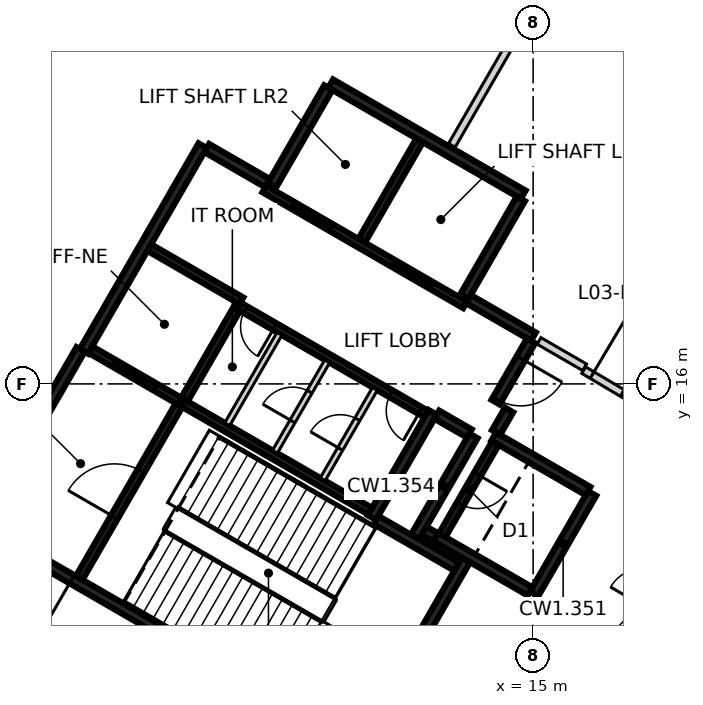
"""IFC4 building model, lengths in metres.
Left out: names, types, materials, properties, quantities, classifications, styles, units other than length and angle.
Written with IfcOpenShell. Run it as: python <this file> out.ifc"""

import sys

from ifc_helpers import new_model, si_unit, direction, frame, frame_2d, origin, place, context, subcontext, project, spatial, rectangle, extrude, element, fill, save


model = new_model("IFC4")
c1 = context("Model", 3, precision=1e-05, world=origin(), true_north=direction((0.0, 1.0)))
c2 = subcontext(c1, "Body", "Model", "MODEL_VIEW")
j1 = project(units=[si_unit("LENGTHUNIT", "METRE"), si_unit("PLANEANGLEUNIT", "RADIAN")], contexts=[c1])
p1 = place(None, origin())
s1 = spatial("IfcSite", under=j1, at=p1, CompositionType="ELEMENT")
p2 = place(p1, origin())
s2 = spatial("IfcBuilding", under=s1, at=p2, CompositionType="ELEMENT")
p3 = place(p2, frame((0.0, 0.0, 19.5)))
s3 = spatial("IfcBuildingStorey", under=s2, at=p3, CompositionType="ELEMENT", Elevation=19.5)
p4 = place(p3, frame((10.42, 6.498, 0.0), z_axis=(0.0, 0.0, 1.0), x_axis=(-0.866021906294, 0.500006057782, 0.0)))
e1 = element("IfcWall", 1, at=p4, inside=s3, PredefinedType="SHEAR", context=c2, shape_type="SweptSolid", body=[
    extrude(rectangle(XDim=11.55, YDim=0.25, at=frame_2d((5.775, 0.0))), origin(), (0.0, 0.0, 1.0), 4.55),
])
p5 = place(p4, frame((10.025, 0.0, 0.0)))
e2 = element("IfcOpeningElement", 2, at=p5, cuts=e1, PredefinedType="OPENING", context=c2, shape_type="SweptSolid", body=[
    extrude(rectangle(XDim=1.2, YDim=2.1, at=frame_2d((0.6, 1.05))), frame((0.0, 0.135, 0.0), z_axis=(0.0, -1.0, 0.0), x_axis=(1.0, 0.0, 0.0)), (0.0, 0.0, 1.0), 0.27),
])
p6 = place(p4, frame((8.725, 0.0, 0.0)))
e3 = element("IfcOpeningElement", 3, at=p6, cuts=e1, PredefinedType="OPENING", context=c2, shape_type="SweptSolid", body=[
    extrude(rectangle(XDim=1.2, YDim=2.1, at=frame_2d((0.6, 1.05))), frame((0.0, 0.135, 0.0), z_axis=(0.0, -1.0, 0.0), x_axis=(1.0, 0.0, 0.0)), (0.0, 0.0, 1.0), 0.27),
])
p7 = place(p3, frame((3.179, 16.856, 0.0), z_axis=(0.0, 0.0, 1.0), x_axis=(0.500004234368, 0.866022959057, 0.0)))
e4 = element("IfcWall", 4, at=p7, inside=s3, PredefinedType="SHEAR", context=c2, shape_type="SweptSolid", body=[
    extrude(rectangle(XDim=6.25, YDim=0.25, at=frame_2d((3.125, 0.0))), origin(), (0.0, 0.0, 1.0), 4.55),
])
p8 = place(p3, frame((9.673, 23.903, 0.0), z_axis=(0.0, 0.0, 1.0), x_axis=(0.86603616409, -0.499981362141, 0.0)))
e5 = element("IfcWall", 5, at=p8, inside=s3, PredefinedType="SHEAR", context=c2, shape_type="SweptSolid", body=[
    extrude(rectangle(XDim=5.85, YDim=0.25, at=frame_2d((2.925, 0.0))), origin(), (0.0, 0.0, 1.0), 4.55),
])
p9 = place(p3, frame((0.48, 12.381, 0.0), z_axis=(0.0, 0.0, 1.0), x_axis=(0.49999885962, 0.866026062182, 0.0)))
e6 = element("IfcWall", 6, at=p9, inside=s3, PredefinedType="SHEAR", context=c2, shape_type="SweptSolid", body=[
    extrude(rectangle(XDim=5.225, YDim=0.25, at=frame_2d((2.612, 0.0))), origin(), (0.0, 0.0, 1.0), 4.55),
])
p10 = place(p3, frame((13.238, 11.378, 0.0), z_axis=(0.0, 0.0, 1.0), x_axis=(-0.500008851346, -0.866020293397, 0.0)))
e7 = element("IfcWall", 7, at=p10, inside=s3, PredefinedType="SHEAR", context=c2, shape_type="SweptSolid", body=[
    extrude(rectangle(XDim=5.51, YDim=0.25, at=frame_2d((2.755, 0.0))), origin(), (0.0, 0.0, 1.0), 4.55),
])
p11 = place(p3, frame((12.357, 15.252, 0.0), z_axis=(0.0, 0.0, 1.0), x_axis=(-0.500028443584, -0.866008981251, 0.0)))
e8 = element("IfcWall", 8, at=p11, inside=s3, PredefinedType="SHEAR", context=c2, shape_type="SweptSolid", body=[
    extrude(rectangle(XDim=3.2, YDim=0.25, at=frame_2d((1.6, 0.0))), origin(), (0.0, 0.0, 1.0), 4.55),
])
for number, where, z_axis, x_axis in (
    (9, (8.123, 21.219, 0.0), (0.0, 0.0, 1.0), (0.5, 0.866, 0.0)),
    (10, (14.676, 20.87, 0.0), (0.0, 0.0, 1.0), (-0.5, -0.866, 0.0)),
):
    element("IfcWall", number, at=place(p3, frame(where, z_axis=z_axis, x_axis=x_axis)), inside=s3, PredefinedType="SHEAR", context=c2, shape_type="SweptSolid", body=[
        extrude(rectangle(XDim=2.975, YDim=0.25, at=frame_2d((1.487, 0.0))), origin(), (0.0, 0.0, 1.0), 4.55),
    ])
p12 = place(p3, frame((16.552, 13.119, 0.0), z_axis=(0.0, 0.0, 1.0), x_axis=(-0.499978833458, -0.866037623948, 0.0)))
e11 = element("IfcWall", 11, at=p12, inside=s3, PredefinedType="SHEAR", context=c2, shape_type="SweptSolid", body=[
    extrude(rectangle(XDim=3.05, YDim=0.25, at=frame_2d((1.525, 0.0))), origin(), (0.0, 0.0, 1.0), 4.55),
])
p13 = place(p3, frame((14.918, 10.54, 0.0), z_axis=(0.0, 0.0, 1.0), x_axis=(-0.866063538972, 0.499933942099, 0.0)))
e12 = element("IfcWall", 12, at=p13, inside=s3, PredefinedType="SHEAR", context=c2, shape_type="SweptSolid", body=[
    extrude(rectangle(XDim=2.865, YDim=0.25, at=frame_2d((1.432, 0.0))), origin(), (0.0, 0.0, 1.0), 4.55),
])
p14 = place(p3, frame((13.963, 14.614, 0.0), z_axis=(0.0, 0.0, 1.0), x_axis=(0.866042235819, -0.499970844928, 0.0)))
e13 = element("IfcWall", 13, at=p14, inside=s3, PredefinedType="SHEAR", context=c2, shape_type="SweptSolid", body=[
    extrude(rectangle(XDim=2.865, YDim=0.25, at=frame_2d((1.432, 0.0))), origin(), (0.0, 0.0, 1.0), 4.55),
])
p15 = place(p3, frame((11.888, 11.961, 0.0), z_axis=(0.0, 0.0, 1.0), x_axis=(0.500003324108, 0.866023484601, 0.0)))
e14 = element("IfcWall", 14, at=p15, inside=s3, PredefinedType="SHEAR", context=c2, shape_type="SweptSolid", body=[
    extrude(rectangle(XDim=3.085, YDim=0.25, at=frame_2d((1.542, 0.0))), origin(), (0.0, 0.0, 1.0), 4.55),
])
p16 = place(p3, frame((10.865, 12.418, 0.0), z_axis=(0.0, 0.0, 1.0), x_axis=(0.866026229868, -0.499998569178, 0.0)))
e15 = element("IfcWall", 15, at=p16, inside=s3, PredefinedType="SHEAR", context=c2, shape_type="SweptSolid", body=[
    extrude(rectangle(XDim=2.449, YDim=0.25, at=frame_2d((1.225, 0.0))), origin(), (0.0, 0.0, 1.0), 4.55),
])
p17 = place(p3, frame((13.297, 18.231, 0.0), z_axis=(0.0, 0.0, 1.0), x_axis=(0.866043531843, -0.499968599967, 0.0)))
e16 = element("IfcWall", 16, at=p17, inside=s3, PredefinedType="SHEAR", context=c2, shape_type="SweptSolid", body=[
    extrude(rectangle(XDim=1.975, YDim=0.25, at=frame_2d((0.987, 0.0))), origin(), (0.0, 0.0, 1.0), 4.55),
])
p18 = place(p3, frame((6.413, 22.206, 0.0), z_axis=(0.0, 0.0, 1.0), x_axis=(0.866016279763, -0.500015802937, 0.0)))
e17 = element("IfcWall", 17, at=p18, inside=s3, PredefinedType="SHEAR", context=c2, shape_type="SweptSolid", body=[
    extrude(rectangle(XDim=1.849, YDim=0.25, at=frame_2d((0.925, 0.0))), origin(), (0.0, 0.0, 1.0), 4.55),
])
p19 = place(p3, frame((14.945, 17.135, 0.0), z_axis=(0.0, 0.0, 1.0), x_axis=(-0.499983108224, -0.866035156036, 0.0)))
e18 = element("IfcWall", 18, at=p19, inside=s3, PredefinedType="SHEAR", context=c2, shape_type="SweptSolid", body=[
    extrude(rectangle(XDim=1.865, YDim=0.25, at=frame_2d((0.932, 0.0))), origin(), (0.0, 0.0, 1.0), 4.55),
])
p20 = place(p19, frame((0.535, 0.0, 0.0)))
e19 = element("IfcOpeningElement", 19, at=p20, cuts=e18, PredefinedType="OPENING", context=c2, shape_type="SweptSolid", body=[
    extrude(rectangle(XDim=1.25, YDim=2.1, at=frame_2d((0.625, 1.05))), frame((0.0, 0.135, 0.0), z_axis=(0.0, -1.0, 0.0), x_axis=(1.0, 0.0, 0.0)), (0.0, 0.0, 1.0), 0.27),
])
p21 = place(p3, frame((13.322, 14.695, 0.0), z_axis=(0.0, 0.0, 1.0), x_axis=(-0.866017078145, 0.500014420154, 0.0)))
e20 = element("IfcWall", 20, at=p21, inside=s3, PredefinedType="SHEAR", context=c2, shape_type="SweptSolid", body=[
    extrude(rectangle(XDim=0.989, YDim=0.25, at=frame_2d((0.495, 0.0))), origin(), (0.0, 0.0, 1.0), 4.55),
])
p22 = place(p3, frame((14.368, 15.315, 0.0), z_axis=(0.0, 0.0, 1.0), x_axis=(-0.499897359611, -0.866084655132, 0.0)))
e21 = element("IfcWall", 21, at=p22, inside=s3, PredefinedType="SHEAR", context=c2, shape_type="SweptSolid", body=[
    extrude(rectangle(XDim=0.685, YDim=0.25, at=frame_2d((0.342, 0.0))), origin(), (0.0, 0.0, 1.0), 4.55),
])
p23 = place(p3, frame((12.433, 11.964, 0.0), z_axis=(0.0, 0.0, 1.0), x_axis=(-0.866055875208, 0.499947218231, 0.0)))
e22 = element("IfcWall", 22, at=p23, inside=s3, PredefinedType="SHEAR", context=c2, shape_type="SweptSolid", body=[
    extrude(rectangle(XDim=0.345, YDim=0.25, at=frame_2d((0.172, 0.0))), origin(), (0.0, 0.0, 1.0), 4.55),
])
p24 = place(p3, frame((13.21, 18.08, 0.0), z_axis=(0.0, 0.0, 1.0), x_axis=(-0.866030299012, 0.499991521122, 0.0)))
e23 = element("IfcWall", 23, at=p24, inside=s3, PredefinedType="SHEAR", context=c2, shape_type="SweptSolid", body=[
    extrude(rectangle(XDim=6.1, YDim=0.2, at=frame_2d((3.05, 0.0))), origin(), (0.0, 0.0, 1.0), 4.55),
])
p25 = place(p24, frame((1.0, 0.0, 0.0)))
e24 = element("IfcOpeningElement", 24, at=p25, cuts=e23, PredefinedType="OPENING", context=c2, shape_type="SweptSolid", body=[
    extrude(rectangle(XDim=1.2, YDim=2.1, at=frame_2d((0.6, 1.05))), frame((0.0, 0.11, 0.0), z_axis=(0.0, -1.0, 0.0), x_axis=(1.0, 0.0, 0.0)), (0.0, 0.0, 1.0), 0.22),
])
p26 = place(p24, frame((4.05, 0.0, 0.0)))
e25 = element("IfcOpeningElement", 25, at=p26, cuts=e23, PredefinedType="OPENING", context=c2, shape_type="SweptSolid", body=[
    extrude(rectangle(XDim=1.2, YDim=2.1, at=frame_2d((0.6, 1.05))), frame((0.0, 0.11, 0.0), z_axis=(0.0, -1.0, 0.0), x_axis=(1.0, 0.0, 0.0)), (0.0, 0.0, 1.0), 0.22),
])
p27 = place(p3, frame((5.775, 15.502, 0.0), z_axis=(0.0, 0.0, 1.0), x_axis=(0.866020080793, -0.500009219579, 0.0)))
e26 = element("IfcWall", 26, at=p27, inside=s3, PredefinedType="SHEAR", context=c2, shape_type="SweptSolid", body=[
    extrude(rectangle(XDim=5.699, YDim=0.2, at=frame_2d((2.85, 0.0))), origin(), (0.0, 0.0, 1.0), 4.55),
])
p28 = place(p3, frame((12.185, 15.207, 0.0), z_axis=(0.0, 0.0, 1.0), x_axis=(-0.866020080793, 0.500009219579, 0.0)))
e27 = element("IfcWall", 27, at=p28, inside=s3, PredefinedType="SHEAR", context=c2, shape_type="SweptSolid", body=[
    extrude(rectangle(XDim=5.699, YDim=0.2, at=frame_2d((2.85, 0.0))), origin(), (0.0, 0.0, 1.0), 4.55),
])
p29 = place(p28, frame((0.174, 0.0, 0.0)))
e28 = element("IfcOpeningElement", 28, at=p29, cuts=e27, PredefinedType="OPENING", context=c2, shape_type="SweptSolid", body=[
    extrude(rectangle(XDim=0.9, YDim=2.1, at=frame_2d((0.45, 1.05))), frame((0.0, 0.11, 0.0), z_axis=(0.0, -1.0, 0.0), x_axis=(1.0, 0.0, 0.0)), (0.0, 0.0, 1.0), 0.22),
])
p30 = place(p28, frame((4.599, 0.0, 0.0)))
e29 = element("IfcOpeningElement", 29, at=p30, cuts=e27, PredefinedType="OPENING", context=c2, shape_type="SweptSolid", body=[
    extrude(rectangle(XDim=0.9, YDim=2.1, at=frame_2d((0.45, 1.05))), frame((0.0, 0.11, 0.0), z_axis=(0.0, -1.0, 0.0), x_axis=(1.0, 0.0, 0.0)), (0.0, 0.0, 1.0), 0.22),
])
p31 = place(p3, frame((3.057, 10.895, 0.0), z_axis=(0.0, 0.0, 1.0), x_axis=(0.499989418164, 0.866031513124, 0.0)))
e30 = element("IfcWall", 30, at=p31, inside=s3, PredefinedType="SHEAR", context=c2, shape_type="SweptSolid", body=[
    extrude(rectangle(XDim=5.251, YDim=0.2, at=frame_2d((2.625, 0.0))), origin(), (0.0, 0.0, 1.0), 4.55),
])
p32 = place(p31, frame((1.849, 0.0, 0.0)))
e31 = element("IfcOpeningElement", 31, at=p32, cuts=e30, PredefinedType="OPENING", context=c2, shape_type="SweptSolid", body=[
    extrude(rectangle(XDim=1.4, YDim=2.1, at=frame_2d((0.7, 1.05))), frame((0.0, 0.11, 0.0), z_axis=(0.0, -1.0, 0.0), x_axis=(1.0, 0.0, 0.0)), (0.0, 0.0, 1.0), 0.22),
])
p33 = place(p3, frame((10.489, 19.767, 0.0), z_axis=(0.0, 0.0, 1.0), x_axis=(0.499946628782, 0.866056215479, 0.0)))
e32 = element("IfcWall", 32, at=p33, inside=s3, PredefinedType="SHEAR", context=c2, shape_type="SweptSolid", body=[
    extrude(rectangle(XDim=3.048, YDim=0.2, at=frame_2d((1.524, 0.0))), origin(), (0.0, 0.0, 1.0), 4.55),
])
p34 = place(p3, frame((14.008, 14.442, 0.0), z_axis=(0.0, 0.0, 1.0), x_axis=(-0.499986818241, -0.866033014143, 0.0)))
e33 = element("IfcWall", 33, at=p34, inside=s3, PredefinedType="SHEAR", context=c2, shape_type="SweptSolid", body=[
    extrude(rectangle(XDim=2.798, YDim=0.2, at=frame_2d((1.399, 0.0))), origin(), (0.0, 0.0, 1.0), 4.55),
])
p35 = place(p34, frame((0.949, 0.0, 0.0)))
e34 = element("IfcOpeningElement", 34, at=p35, cuts=e33, PredefinedType="OPENING", context=c2, shape_type="SweptSolid", body=[
    extrude(rectangle(XDim=0.9, YDim=2.1, at=frame_2d((0.45, 1.05))), frame((0.0, 0.11, 0.0), z_axis=(0.0, -1.0, 0.0), x_axis=(1.0, 0.0, 0.0)), (0.0, 0.0, 1.0), 0.22),
])
p36 = place(p3, frame((7.199, 17.97, 0.0), z_axis=(0.0, 0.0, 1.0), x_axis=(-0.499968400327, -0.866043647095, 0.0)))
e35 = element("IfcWall", 35, at=p36, inside=s3, PredefinedType="SHEAR", context=c2, shape_type="SweptSolid", body=[
    extrude(rectangle(XDim=2.75, YDim=0.2, at=frame_2d((1.375, 0.0))), origin(), (0.0, 0.0, 1.0), 4.55),
])
p37 = place(p3, frame((5.725, 15.531, 0.0), z_axis=(0.0, 0.0, 1.0), x_axis=(-0.866037306777, 0.499979382845, 0.0)))
e36 = element("IfcWall", 36, at=p37, inside=s3, PredefinedType="SHEAR", context=c2, shape_type="SweptSolid", body=[
    extrude(rectangle(XDim=2.742, YDim=0.2, at=frame_2d((1.371, 0.0))), origin(), (0.0, 0.0, 1.0), 4.55),
])
p38 = place(p37, frame((0.743, 0.0, 0.0)))
e37 = element("IfcOpeningElement", 37, at=p38, cuts=e36, PredefinedType="OPENING", context=c2, shape_type="SweptSolid", body=[
    extrude(rectangle(XDim=1.3, YDim=2.1, at=frame_2d((0.65, 1.05))), frame((0.0, 0.11, 0.0), z_axis=(0.0, -1.0, 0.0), x_axis=(1.0, 0.0, 0.0)), (0.0, 0.0, 1.0), 0.22),
])
p39 = place(p3, frame((4.901, 19.586, 0.0), z_axis=(0.0, 0.0, 1.0), x_axis=(0.866022890907, -0.500004352405, 0.0)))
e38 = element("IfcWall", 38, at=p39, inside=s3, PredefinedType="SHEAR", context=c2, shape_type="SweptSolid", body=[
    extrude(rectangle(XDim=2.799, YDim=0.2, at=frame_2d((1.399, 0.0))), origin(), (0.0, 0.0, 1.0), 4.55),
])
p40 = place(p3, frame((9.462, 13.489, 0.0), z_axis=(0.0, 0.0, 1.0), x_axis=(0.50002746344, 0.86600954718, 0.0)))
e39 = element("IfcWall", 39, at=p40, inside=s3, PredefinedType="PARTITIONING", context=c2, shape_type="SweptSolid", body=[
    extrude(rectangle(XDim=2.748, YDim=0.15, at=frame_2d((1.374, 0.0))), origin(), (0.0, 0.0, 1.0), 4.55),
])
p41 = place(p40, frame((0.924, 0.0, 0.0)))
e40 = element("IfcOpeningElement", 40, at=p41, cuts=e39, PredefinedType="OPENING", context=c2, shape_type="SweptSolid", body=[
    extrude(rectangle(XDim=0.9, YDim=2.1, at=frame_2d((0.45, 1.05))), frame((0.0, 0.085, 0.0), z_axis=(0.0, -1.0, 0.0), x_axis=(1.0, 0.0, 0.0)), (0.0, 0.0, 1.0), 0.17),
])
p42 = place(p3, frame((8.207, 14.214, 0.0), z_axis=(0.0, 0.0, 1.0), x_axis=(0.499922376475, 0.866070215109, 0.0)))
e41 = element("IfcWall", 41, at=p42, inside=s3, PredefinedType="PARTITIONING", context=c2, shape_type="SweptSolid", body=[
    extrude(rectangle(XDim=2.749, YDim=0.15, at=frame_2d((1.374, 0.0))), origin(), (0.0, 0.0, 1.0), 4.55),
])
p43 = place(p42, frame((0.924, 0.0, 0.0)))
e42 = element("IfcOpeningElement", 42, at=p43, cuts=e41, PredefinedType="OPENING", context=c2, shape_type="SweptSolid", body=[
    extrude(rectangle(XDim=0.9, YDim=2.1, at=frame_2d((0.45, 1.05))), frame((0.0, 0.085, 0.0), z_axis=(0.0, -1.0, 0.0), x_axis=(1.0, 0.0, 0.0)), (0.0, 0.0, 1.0), 0.17),
])
p44 = place(p3, frame((6.951, 14.939, 0.0), z_axis=(0.0, 0.0, 1.0), x_axis=(0.50002746344, 0.86600954718, 0.0)))
e43 = element("IfcWall", 43, at=p44, inside=s3, PredefinedType="PARTITIONING", context=c2, shape_type="SweptSolid", body=[
    extrude(rectangle(XDim=2.748, YDim=0.15, at=frame_2d((1.374, 0.0))), origin(), (0.0, 0.0, 1.0), 4.55),
])
p45 = place(p3, frame((15.156, 17.131, 0.0), z_axis=(0.0, 0.0, 1.0), x_axis=(0.865639364436, -0.500668044455, 0.0)))
e44 = element("IfcWall", 44, at=p45, inside=s3, PredefinedType="PARTITIONING", context=c2, shape_type="SweptSolid", body=[
    extrude(rectangle(XDim=1.385, YDim=0.2, at=frame_2d((0.693, 0.0))), origin(), (0.0, 0.0, 1.0), 4.55),
])
p46 = place(p3, frame((16.331, 16.362, 0.0), z_axis=(0.0, 0.0, 1.0), x_axis=(0.860005465563, -0.510284821645, 0.0)))
e45 = element("IfcWall", 45, at=p46, inside=s3, PredefinedType="PARTITIONING", context=c2, shape_type="SweptSolid", body=[
    extrude(rectangle(XDim=2.51, YDim=0.2, at=frame_2d((1.255, 0.0))), origin(), (0.0, 0.0, 1.0), 4.55),
])
p47 = place(p46, frame((0.255, 0.0, 0.0)))
e46 = element("IfcOpeningElement", 46, at=p47, cuts=e45, PredefinedType="OPENING", context=c2, shape_type="SweptSolid", body=[
    extrude(rectangle(XDim=2.0, YDim=2.1, at=frame_2d((1.0, 1.05))), frame((0.0, 0.11, 0.0), z_axis=(0.0, -1.0, 0.0), x_axis=(1.0, 0.0, 0.0)), (0.0, 0.0, 1.0), 0.22),
])
p48 = place(p3, frame((16.957, 8.541, 0.0), z_axis=(0.0, 0.0, 1.0), x_axis=(0.506286576042, 0.862365295522, 0.0)))
e47 = element("IfcWall", 47, at=p48, inside=s3, PredefinedType="PARTITIONING", context=c2, shape_type="SweptSolid", body=[
    extrude(rectangle(XDim=4.452, YDim=0.2, at=frame_2d((2.226, 0.0))), origin(), (0.0, 0.0, 1.0), 4.55),
])
p49 = place(p48, frame((1.865, 0.0, 0.0)))
e48 = element("IfcOpeningElement", 48, at=p49, cuts=e47, PredefinedType="OPENING", context=c2, shape_type="SweptSolid", body=[
    extrude(rectangle(XDim=1.0, YDim=2.1, at=frame_2d((0.5, 1.05))), frame((0.0, 0.11, 0.0), z_axis=(0.0, -1.0, 0.0), x_axis=(1.0, 0.0, 0.0)), (0.0, 0.0, 1.0), 0.22),
])
p50 = place(p3, frame((12.861, 22.276, 0.0), z_axis=(0.0, 0.0, 1.0), x_axis=(0.499989278408, 0.86603159381, 0.0)))
e49 = element("IfcWall", 49, at=p50, inside=s3, PredefinedType="PARTITIONING", context=c2, shape_type="SweptSolid", body=[
    extrude(rectangle(XDim=19.273, YDim=0.2, at=frame_2d((9.636, 0.0))), origin(), (0.0, 0.0, 1.0), 4.55),
])
p51 = place(p50, frame((5.673, 0.0, 0.0)))
e50 = element("IfcOpeningElement", 50, at=p51, cuts=e49, PredefinedType="OPENING", context=c2, shape_type="SweptSolid", body=[
    extrude(rectangle(XDim=2.0, YDim=2.1, at=frame_2d((1.0, 1.05))), frame((0.0, 0.11, 0.0), z_axis=(0.0, -1.0, 0.0), x_axis=(1.0, 0.0, 0.0)), (0.0, 0.0, 1.0), 0.22),
])
p52 = place(p3, frame((17.103, 8.787, 0.0), z_axis=(0.0, 0.0, 1.0), x_axis=(0.889456094774, 0.457020629151, 0.0)))
e51 = element("IfcWall", 51, at=p52, inside=s3, PredefinedType="PARTITIONING", context=c2, shape_type="SweptSolid", body=[
    extrude(rectangle(XDim=11.122, YDim=0.2, at=frame_2d((5.561, 0.0))), origin(), (0.0, 0.0, 1.0), 2.15),
])
p53 = place(p38, origin())
e52 = element("IfcDoor", 52, at=p53, inside=s3, OperationType="SLIDING_TO_RIGHT", PredefinedType="DOOR", context=c2, shape_type="SweptSolid", body=[
    extrude(rectangle(XDim=1.3, YDim=2.1, at=frame_2d((0.65, 1.05))), frame((0.0, 0.025, 0.0), z_axis=(0.0, -1.0, 0.0), x_axis=(1.0, 0.0, 0.0)), (0.0, 0.0, 1.0), 0.05),
])
fill(e37, e52)
p54 = place(p25, origin())
e53 = element("IfcDoor", 53, at=p54, inside=s3, OperationType="DOUBLE_DOOR_SLIDING", PredefinedType="DOOR", context=c2, shape_type="SweptSolid", body=[
    extrude(rectangle(XDim=1.2, YDim=2.1, at=frame_2d((0.6, 1.05))), frame((0.0, 0.025, 0.0), z_axis=(0.0, -1.0, 0.0), x_axis=(1.0, 0.0, 0.0)), (0.0, 0.0, 1.0), 0.05),
])
fill(e24, e53)
p55 = place(p26, origin())
e54 = element("IfcDoor", 54, at=p55, inside=s3, OperationType="DOUBLE_DOOR_SLIDING", PredefinedType="DOOR", context=c2, shape_type="SweptSolid", body=[
    extrude(rectangle(XDim=1.2, YDim=2.1, at=frame_2d((0.6, 1.05))), frame((0.0, 0.025, 0.0), z_axis=(0.0, -1.0, 0.0), x_axis=(1.0, 0.0, 0.0)), (0.0, 0.0, 1.0), 0.05),
])
fill(e25, e54)
p56 = place(p20, origin())
e55 = element("IfcDoor", 55, at=p56, inside=s3, OperationType="SINGLE_SWING_LEFT", PredefinedType="DOOR", context=c2, shape_type="SweptSolid", body=[
    extrude(rectangle(XDim=1.25, YDim=2.1, at=frame_2d((0.625, 1.05))), frame((0.0, 0.025, 0.0), z_axis=(0.0, -1.0, 0.0), x_axis=(1.0, 0.0, 0.0)), (0.0, 0.0, 1.0), 0.05),
])
fill(e19, e55)
p57 = place(p6, origin())
e56 = element("IfcDoor", 56, at=p57, inside=s3, OperationType="SINGLE_SWING_RIGHT", PredefinedType="DOOR", context=c2, shape_type="SweptSolid", body=[
    extrude(rectangle(XDim=1.2, YDim=2.1, at=frame_2d((0.6, 1.05))), frame((0.0, 0.025, 0.0), z_axis=(0.0, -1.0, 0.0), x_axis=(1.0, 0.0, 0.0)), (0.0, 0.0, 1.0), 0.05),
])
fill(e3, e56)
p58 = place(p32, origin())
e57 = element("IfcDoor", 57, at=p58, inside=s3, OperationType="SINGLE_SWING_RIGHT", PredefinedType="DOOR", context=c2, shape_type="SweptSolid", body=[
    extrude(rectangle(XDim=1.4, YDim=2.1, at=frame_2d((0.7, 1.05))), frame((0.0, 0.025, 0.0), z_axis=(0.0, -1.0, 0.0), x_axis=(1.0, 0.0, 0.0)), (0.0, 0.0, 1.0), 0.05),
])
fill(e31, e57)
p59 = place(p29, origin())
e58 = element("IfcDoor", 58, at=p59, inside=s3, OperationType="SINGLE_SWING_LEFT", PredefinedType="DOOR", context=c2, shape_type="SweptSolid", body=[
    extrude(rectangle(XDim=0.9, YDim=2.1, at=frame_2d((0.45, 1.05))), frame((0.0, 0.025, 0.0), z_axis=(0.0, -1.0, 0.0), x_axis=(1.0, 0.0, 0.0)), (0.0, 0.0, 1.0), 0.05),
])
fill(e28, e58)
p60 = place(p41, origin())
e59 = element("IfcDoor", 59, at=p60, inside=s3, OperationType="SINGLE_SWING_RIGHT", PredefinedType="DOOR", context=c2, shape_type="SweptSolid", body=[
    extrude(rectangle(XDim=0.9, YDim=2.1, at=frame_2d((0.45, 1.05))), frame((0.0, 0.025, 0.0), z_axis=(0.0, -1.0, 0.0), x_axis=(1.0, 0.0, 0.0)), (0.0, 0.0, 1.0), 0.05),
])
fill(e40, e59)
p61 = place(p43, origin())
e60 = element("IfcDoor", 60, at=p61, inside=s3, OperationType="SINGLE_SWING_LEFT", PredefinedType="DOOR", context=c2, shape_type="SweptSolid", body=[
    extrude(rectangle(XDim=0.9, YDim=2.1, at=frame_2d((0.45, 1.05))), frame((0.0, 0.025, 0.0), z_axis=(0.0, -1.0, 0.0), x_axis=(1.0, 0.0, 0.0)), (0.0, 0.0, 1.0), 0.05),
])
fill(e42, e60)
p62 = place(p30, origin())
e61 = element("IfcDoor", 61, at=p62, inside=s3, OperationType="SINGLE_SWING_RIGHT", PredefinedType="DOOR", context=c2, shape_type="SweptSolid", body=[
    extrude(rectangle(XDim=0.9, YDim=2.1, at=frame_2d((0.45, 1.05))), frame((0.0, 0.025, 0.0), z_axis=(0.0, -1.0, 0.0), x_axis=(1.0, 0.0, 0.0)), (0.0, 0.0, 1.0), 0.05),
])
fill(e29, e61)
p63 = place(p35, origin())
e62 = element("IfcDoor", 62, at=p63, inside=s3, OperationType="SINGLE_SWING_LEFT", PredefinedType="DOOR", context=c2, shape_type="SweptSolid", body=[
    extrude(rectangle(XDim=0.9, YDim=2.1, at=frame_2d((0.45, 1.05))), frame((0.0, 0.025, 0.0), z_axis=(0.0, -1.0, 0.0), x_axis=(1.0, 0.0, 0.0)), (0.0, 0.0, 1.0), 0.05),
])
fill(e34, e62)
p64 = place(p47, origin())
e63 = element("IfcDoor", 63, at=p64, inside=s3, OperationType="DOUBLE_DOOR_SINGLE_SWING", PredefinedType="DOOR", context=c2, shape_type="SweptSolid", body=[
    extrude(rectangle(XDim=2.0, YDim=2.1, at=frame_2d((1.0, 1.05))), frame((0.0, 0.025, 0.0), z_axis=(0.0, -1.0, 0.0), x_axis=(1.0, 0.0, 0.0)), (0.0, 0.0, 1.0), 0.05),
])
fill(e46, e63)
save(model, sys.argv[1])
